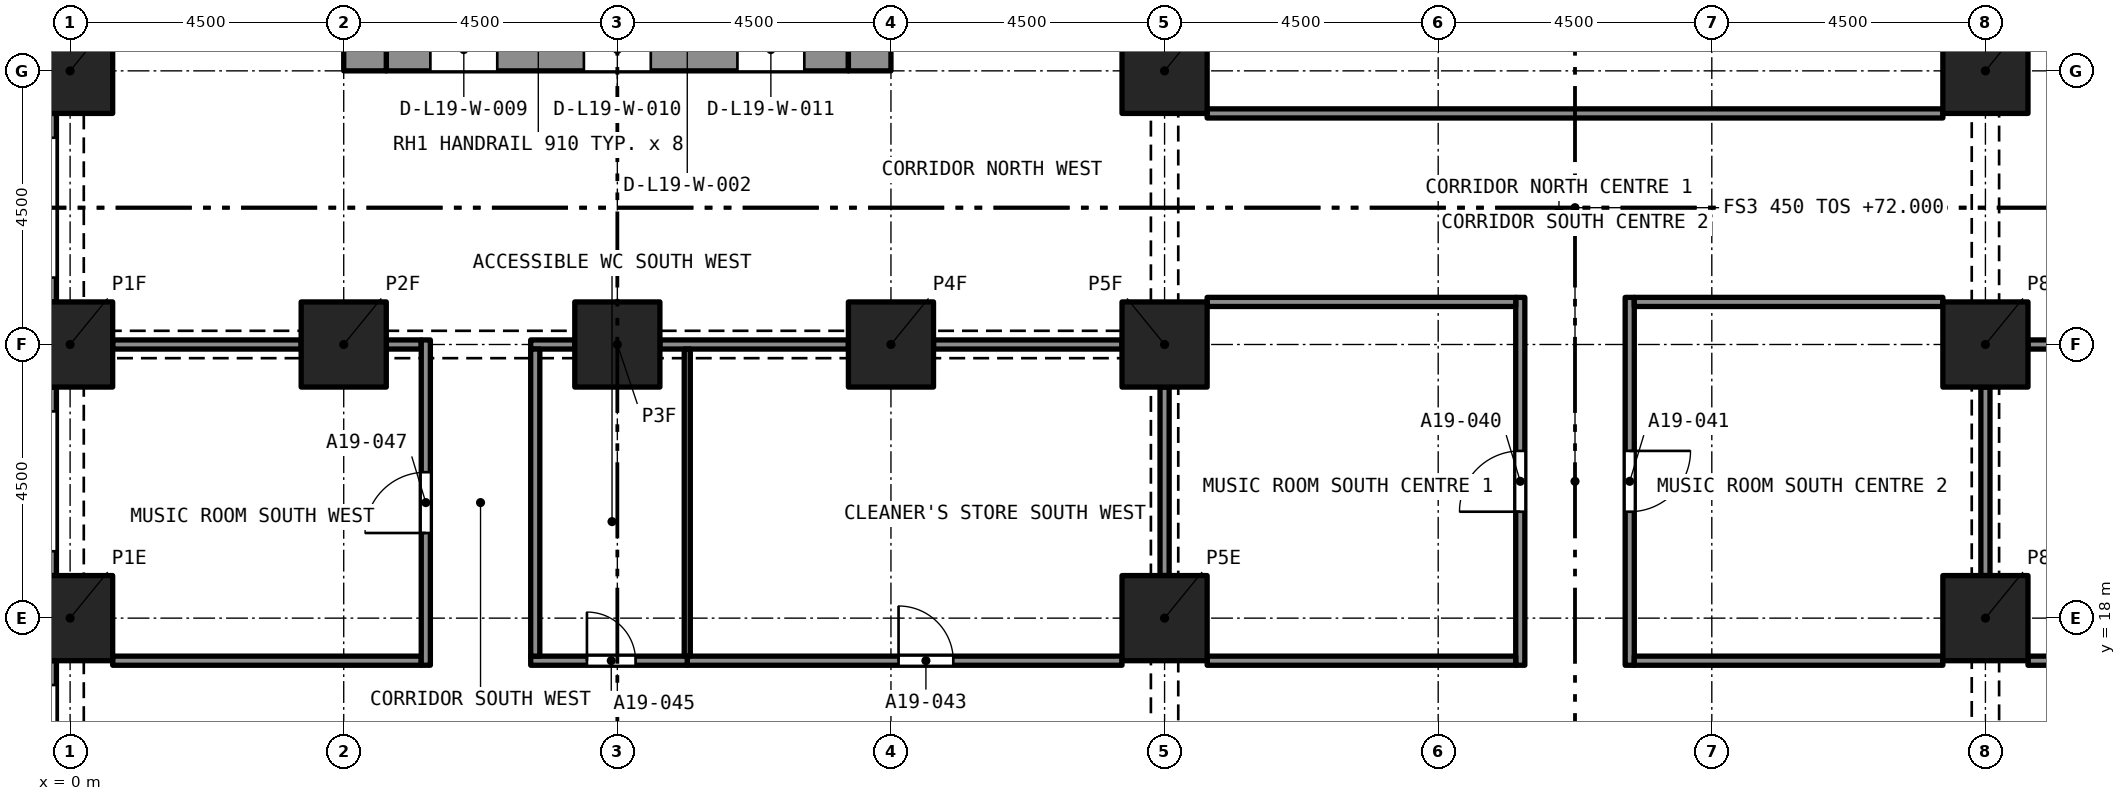
"""IFC4 building model, lengths in metres.
Left out: names, types, materials, properties, quantities, classifications, styles, units other than length and angle.
Written with IfcOpenShell. Run it as: python <this file> out.ifc"""

import sys

from ifc_helpers import new_model, si_unit, direction, frame, frame_2d, origin, origin_2d, place, context, subcontext, project, spatial, rectangle, extrude, element, fill, save


model = new_model("IFC4")
c1 = context("Model", 3, precision=1e-05, world=origin(), true_north=direction((0.0, 1.0)))
c2 = subcontext(c1, "Body", "Model", "MODEL_VIEW")
j1 = project(units=[si_unit("LENGTHUNIT", "METRE"), si_unit("PLANEANGLEUNIT", "RADIAN")], contexts=[c1])
p1 = place(None, origin())
s1 = spatial("IfcSite", under=j1, at=p1, CompositionType="ELEMENT")
p2 = place(p1, origin())
s2 = spatial("IfcBuilding", under=s1, at=p2, CompositionType="ELEMENT")
p3 = place(p2, frame((0.0, 0.0, 72.0)))
s3 = spatial("IfcBuildingStorey", under=s2, at=p3, CompositionType="ELEMENT", Elevation=72.0)
for number, where, z_axis, x_axis in (
    (1, (0.0, 18.0, 0.0), (0.0, 0.0, 1.0), (1.0, 0.0, 0.0)),
    (2, (18.0, 18.0, 0.0), (0.0, 0.0, 1.0), (1.0, 0.0, 0.0)),
    (3, (31.5, 18.0, 0.0), (0.0, 0.0, 1.0), (1.0, 0.0, 0.0)),
    (4, (0.0, 22.5, 0.0), (0.0, 0.0, 1.0), (1.0, 0.0, 0.0)),
    (5, (4.5, 22.5, 0.0), (0.0, 0.0, 1.0), (1.0, 0.0, 0.0)),
    (6, (9.0, 22.5, 0.0), (0.0, 0.0, 1.0), (1.0, 0.0, 0.0)),
    (7, (13.5, 22.5, 0.0), (0.0, 0.0, 1.0), (1.0, 0.0, 0.0)),
    (8, (18.0, 22.5, 0.0), (0.0, 0.0, 1.0), (1.0, 0.0, 0.0)),
    (9, (31.5, 22.5, 0.0), (0.0, 0.0, 1.0), (1.0, 0.0, 0.0)),
    (10, (0.0, 27.0, 0.0), (0.0, 0.0, 1.0), (1.0, 0.0, 0.0)),
    (11, (18.0, 27.0, 0.0), (0.0, 0.0, 1.0), (1.0, 0.0, 0.0)),
    (12, (31.5, 27.0, 0.0), (0.0, 0.0, 1.0), (1.0, 0.0, 0.0)),
):
    element("IfcColumn", number, at=place(p3, frame(where, z_axis=z_axis, x_axis=x_axis)), inside=s3, PredefinedType="COLUMN", context=c2, shape_type="SweptSolid", body=[
        extrude(rectangle(XDim=1.4, YDim=1.4, at=origin_2d()), origin(), (0.0, 0.0, 1.0), 3.2),
    ])
p4 = place(p3, frame((5.2, 27.35, 0.0), z_axis=(0.0, 0.0, 1.0), x_axis=(1.0, 0.0, 0.0)))
e13 = element("IfcWall", 13, at=p4, inside=s3, PredefinedType="SOLIDWALL", context=c2, shape_type="SweptSolid", body=[
    extrude(rectangle(XDim=7.6, YDim=0.7, at=frame_2d((3.8, 0.0))), origin(), (0.0, 0.0, 1.0), 3.2),
])
p5 = place(p4, frame((0.725, 0.0, 0.0)))
e14 = element("IfcOpeningElement", 14, at=p5, cuts=e13, PredefinedType="OPENING", context=c2, shape_type="SweptSolid", body=[
    extrude(rectangle(XDim=1.1, YDim=2.1, at=frame_2d((0.55, 1.05))), frame((0.0, 0.36, 0.0), z_axis=(0.0, -1.0, 0.0), x_axis=(1.0, 0.0, 0.0)), (0.0, 0.0, 1.0), 0.72),
])
p6 = place(p4, frame((3.25, 0.0, 0.0)))
e15 = element("IfcOpeningElement", 15, at=p6, cuts=e13, PredefinedType="OPENING", context=c2, shape_type="SweptSolid", body=[
    extrude(rectangle(XDim=1.1, YDim=2.1, at=frame_2d((0.55, 1.05))), frame((0.0, 0.36, 0.0), z_axis=(0.0, -1.0, 0.0), x_axis=(1.0, 0.0, 0.0)), (0.0, 0.0, 1.0), 0.72),
])
p7 = place(p4, frame((5.775, 0.0, 0.0)))
e16 = element("IfcOpeningElement", 16, at=p7, cuts=e13, PredefinedType="OPENING", context=c2, shape_type="SweptSolid", body=[
    extrude(rectangle(XDim=1.1, YDim=2.1, at=frame_2d((0.55, 1.05))), frame((0.0, 0.36, 0.0), z_axis=(0.0, -1.0, 0.0), x_axis=(1.0, 0.0, 0.0)), (0.0, 0.0, 1.0), 0.72),
])
p8 = place(p3, frame((4.85, 27.0, 0.0), z_axis=(0.0, 0.0, 1.0), x_axis=(0.0, 1.0, 0.0)))
e17 = element("IfcWall", 17, at=p8, inside=s3, PredefinedType="SOLIDWALL", context=c2, shape_type="SweptSolid", body=[
    extrude(rectangle(XDim=13.5, YDim=0.7, at=frame_2d((6.75, 0.0))), origin(), (0.0, 0.0, 1.0), 3.2),
])
p9 = place(p8, frame((8.95, 0.0, 0.0)))
e18 = element("IfcOpeningElement", 18, at=p9, cuts=e17, PredefinedType="OPENING", context=c2, shape_type="SweptSolid", body=[
    extrude(rectangle(XDim=1.2, YDim=2.1, at=frame_2d((0.6, 1.05))), frame((0.0, 0.36, 0.0), z_axis=(0.0, -1.0, 0.0), x_axis=(1.0, 0.0, 0.0)), (0.0, 0.0, 1.0), 0.72),
])
p10 = place(p3, frame((13.15, 27.0, 0.0), z_axis=(0.0, 0.0, 1.0), x_axis=(0.0, 1.0, 0.0)))
e19 = element("IfcWall", 19, at=p10, inside=s3, PredefinedType="SOLIDWALL", context=c2, shape_type="SweptSolid", body=[
    extrude(rectangle(XDim=13.5, YDim=0.7, at=frame_2d((6.75, 0.0))), origin(), (0.0, 0.0, 1.0), 3.2),
])
p11 = place(p10, frame((11.1, 0.0, 0.0)))
e20 = element("IfcOpeningElement", 20, at=p11, cuts=e19, PredefinedType="OPENING", context=c2, shape_type="SweptSolid", body=[
    extrude(rectangle(XDim=1.1, YDim=2.1, at=frame_2d((0.55, 1.05))), frame((0.0, 0.36, 0.0), z_axis=(0.0, -1.0, 0.0), x_axis=(1.0, 0.0, 0.0)), (0.0, 0.0, 1.0), 0.72),
])
p12 = place(p10, frame((8.95, 0.0, 0.0)))
e21 = element("IfcOpeningElement", 21, at=p12, cuts=e19, PredefinedType="OPENING", context=c2, shape_type="SweptSolid", body=[
    extrude(rectangle(XDim=1.2, YDim=2.1, at=frame_2d((0.6, 1.05))), frame((0.0, 0.36, 0.0), z_axis=(0.0, -1.0, 0.0), x_axis=(1.0, 0.0, 0.0)), (0.0, 0.0, 1.0), 0.72),
])
p13 = place(p3, frame((-0.375, 23.2, 0.0), z_axis=(0.0, 0.0, 1.0), x_axis=(0.0, 1.0, 0.0)))
e22 = element("IfcWall", 22, at=p13, inside=s3, PredefinedType="SOLIDWALL", context=c2, shape_type="SweptSolid", body=[
    extrude(rectangle(XDim=3.1, YDim=0.3, at=frame_2d((1.55, 0.0))), origin(), (0.0, 0.0, 1.0), 3.2),
])
p14 = place(p13, frame((0.4, 0.0, 0.45)))
e23 = element("IfcOpeningElement", 23, at=p14, cuts=e22, PredefinedType="OPENING", context=c2, shape_type="SweptSolid", body=[
    extrude(rectangle(XDim=2.3, YDim=1.95, at=frame_2d((1.15, 0.975))), frame((0.0, 0.16, 0.0), z_axis=(0.0, -1.0, 0.0), x_axis=(1.0, 0.0, 0.0)), (0.0, 0.0, 1.0), 0.32),
])
p15 = place(p3, frame((-0.375, 18.7, 0.0), z_axis=(0.0, 0.0, 1.0), x_axis=(0.0, 1.0, 0.0)))
e24 = element("IfcWall", 24, at=p15, inside=s3, PredefinedType="SOLIDWALL", context=c2, shape_type="SweptSolid", body=[
    extrude(rectangle(XDim=3.1, YDim=0.3, at=frame_2d((1.55, 0.0))), origin(), (0.0, 0.0, 1.0), 3.2),
])
p16 = place(p15, frame((0.4, 0.0, 0.45)))
e25 = element("IfcOpeningElement", 25, at=p16, cuts=e24, PredefinedType="OPENING", context=c2, shape_type="SweptSolid", body=[
    extrude(rectangle(XDim=2.3, YDim=1.95, at=frame_2d((1.15, 0.975))), frame((0.0, 0.16, 0.0), z_axis=(0.0, -1.0, 0.0), x_axis=(1.0, 0.0, 0.0)), (0.0, 0.0, 1.0), 0.32),
])
p17 = place(p3, frame((-0.375, 14.2, 0.0), z_axis=(0.0, 0.0, 1.0), x_axis=(0.0, 1.0, 0.0)))
e26 = element("IfcWall", 26, at=p17, inside=s3, PredefinedType="SOLIDWALL", context=c2, shape_type="SweptSolid", body=[
    extrude(rectangle(XDim=3.1, YDim=0.3, at=frame_2d((1.55, 0.0))), origin(), (0.0, 0.0, 1.0), 3.2),
])
p18 = place(p17, frame((0.4, 0.0, 0.45)))
e27 = element("IfcOpeningElement", 27, at=p18, cuts=e26, PredefinedType="OPENING", context=c2, shape_type="SweptSolid", body=[
    extrude(rectangle(XDim=2.3, YDim=1.95, at=frame_2d((1.15, 0.975))), frame((0.0, 0.16, 0.0), z_axis=(0.0, -1.0, 0.0), x_axis=(1.0, 0.0, 0.0)), (0.0, 0.0, 1.0), 0.32),
])
p19 = place(p3, frame((23.85, 17.225, 0.0), z_axis=(0.0, 0.0, 1.0), x_axis=(0.0, 1.0, 0.0)))
e28 = element("IfcWall", 28, at=p19, inside=s3, PredefinedType="PARTITIONING", context=c2, shape_type="SweptSolid", body=[
    extrude(rectangle(XDim=6.05, YDim=0.15, at=frame_2d((3.025, 0.0))), origin(), (0.0, 0.0, 1.0), 2.7),
])
p20 = place(p19, frame((2.525, 0.0, 0.0)))
e29 = element("IfcOpeningElement", 29, at=p20, cuts=e28, PredefinedType="OPENING", context=c2, shape_type="SweptSolid", body=[
    extrude(rectangle(XDim=1.0, YDim=2.1, at=frame_2d((0.5, 1.05))), frame((0.0, 0.085, 0.0), z_axis=(0.0, -1.0, 0.0), x_axis=(1.0, 0.0, 0.0)), (0.0, 0.0, 1.0), 0.17),
])
p21 = place(p3, frame((25.65, 23.275, 0.0), z_axis=(0.0, 0.0, 1.0), x_axis=(0.0, -1.0, 0.0)))
e30 = element("IfcWall", 30, at=p21, inside=s3, PredefinedType="PARTITIONING", context=c2, shape_type="SweptSolid", body=[
    extrude(rectangle(XDim=6.05, YDim=0.15, at=frame_2d((3.025, 0.0))), origin(), (0.0, 0.0, 1.0), 2.7),
])
p22 = place(p21, frame((2.525, 0.0, 0.0)))
e31 = element("IfcOpeningElement", 31, at=p22, cuts=e30, PredefinedType="OPENING", context=c2, shape_type="SweptSolid", body=[
    extrude(rectangle(XDim=1.0, YDim=2.1, at=frame_2d((0.5, 1.05))), frame((0.0, 0.085, 0.0), z_axis=(0.0, -1.0, 0.0), x_axis=(1.0, 0.0, 0.0)), (0.0, 0.0, 1.0), 0.17),
])
for number, where, z_axis, x_axis in (
    (32, (18.7, 17.3, 0.0), (0.0, 0.0, 1.0), (1.0, 0.0, 0.0)),
    (33, (25.725, 17.3, 0.0), (0.0, 0.0, 1.0), (1.0, 0.0, 0.0)),
):
    element("IfcWall", number, at=place(p3, frame(where, z_axis=z_axis, x_axis=x_axis)), inside=s3, PredefinedType="PARTITIONING", context=c2, shape_type="SweptSolid", body=[
        extrude(rectangle(XDim=5.075, YDim=0.15, at=frame_2d((2.538, 0.0))), origin(), (0.0, 0.0, 1.0), 2.7),
    ])
p23 = place(p3, frame((32.2, 17.3, 0.0), z_axis=(0.0, 0.0, 1.0), x_axis=(1.0, 0.0, 0.0)))
e34 = element("IfcWall", 34, at=p23, inside=s3, PredefinedType="PARTITIONING", context=c2, shape_type="SweptSolid", body=[
    extrude(rectangle(XDim=7.15, YDim=0.15, at=frame_2d((3.575, 0.0))), origin(), (0.0, 0.0, 1.0), 2.7),
])
p24 = place(p23, frame((2.775, 0.0, 0.0)))
e35 = element("IfcOpeningElement", 35, at=p24, cuts=e34, PredefinedType="OPENING", context=c2, shape_type="SweptSolid", body=[
    extrude(rectangle(XDim=0.9, YDim=2.1, at=frame_2d((0.45, 1.05))), frame((0.0, 0.085, 0.0), z_axis=(0.0, -1.0, 0.0), x_axis=(1.0, 0.0, 0.0)), (0.0, 0.0, 1.0), 0.17),
])
p25 = place(p3, frame((10.15, 17.3, 0.0), z_axis=(0.0, 0.0, 1.0), x_axis=(1.0, 0.0, 0.0)))
e36 = element("IfcWall", 36, at=p25, inside=s3, PredefinedType="PARTITIONING", context=c2, shape_type="SweptSolid", body=[
    extrude(rectangle(XDim=7.15, YDim=0.15, at=frame_2d((3.575, 0.0))), origin(), (0.0, 0.0, 1.0), 2.7),
])
p26 = place(p25, frame((3.475, 0.0, 0.0)))
e37 = element("IfcOpeningElement", 37, at=p26, cuts=e36, PredefinedType="OPENING", context=c2, shape_type="SweptSolid", body=[
    extrude(rectangle(XDim=0.9, YDim=2.1, at=frame_2d((0.45, 1.05))), frame((0.0, 0.085, 0.0), z_axis=(0.0, -1.0, 0.0), x_axis=(1.0, 0.0, 0.0)), (0.0, 0.0, 1.0), 0.17),
])
p27 = place(p3, frame((7.575, 17.3, 0.0), z_axis=(0.0, 0.0, 1.0), x_axis=(1.0, 0.0, 0.0)))
e38 = element("IfcWall", 38, at=p27, inside=s3, PredefinedType="PARTITIONING", context=c2, shape_type="SweptSolid", body=[
    extrude(rectangle(XDim=2.575, YDim=0.15, at=frame_2d((1.288, 0.0))), origin(), (0.0, 0.0, 1.0), 2.7),
])
p28 = place(p27, frame((0.925, 0.0, 0.0)))
e39 = element("IfcOpeningElement", 39, at=p28, cuts=e38, PredefinedType="OPENING", context=c2, shape_type="SweptSolid", body=[
    extrude(rectangle(XDim=0.8, YDim=2.1, at=frame_2d((0.4, 1.05))), frame((0.0, 0.085, 0.0), z_axis=(0.0, -1.0, 0.0), x_axis=(1.0, 0.0, 0.0)), (0.0, 0.0, 1.0), 0.17),
])
p29 = place(p3, frame((0.7, 17.3, 0.0), z_axis=(0.0, 0.0, 1.0), x_axis=(1.0, 0.0, 0.0)))
e40 = element("IfcWall", 40, at=p29, inside=s3, PredefinedType="PARTITIONING", context=c2, shape_type="SweptSolid", body=[
    extrude(rectangle(XDim=5.075, YDim=0.15, at=frame_2d((2.538, 0.0))), origin(), (0.0, 0.0, 1.0), 2.7),
])
p30 = place(p3, frame((18.7, 26.3, 0.0), z_axis=(0.0, 0.0, 1.0), x_axis=(1.0, 0.0, 0.0)))
e41 = element("IfcWall", 41, at=p30, inside=s3, PredefinedType="PARTITIONING", context=c2, shape_type="SweptSolid", body=[
    extrude(rectangle(XDim=12.1, YDim=0.15, at=frame_2d((6.05, 0.0))), origin(), (0.0, 0.0, 1.0), 2.7),
])
p31 = place(p3, frame((18.7, 23.2, 0.0), z_axis=(0.0, 0.0, 1.0), x_axis=(1.0, 0.0, 0.0)))
e42 = element("IfcWall", 42, at=p31, inside=s3, PredefinedType="PARTITIONING", context=c2, shape_type="SweptSolid", body=[
    extrude(rectangle(XDim=5.075, YDim=0.15, at=frame_2d((2.538, 0.0))), origin(), (0.0, 0.0, 1.0), 2.7),
])
p32 = place(p3, frame((18.0, 18.7, 0.0), z_axis=(0.0, 0.0, 1.0), x_axis=(0.0, 1.0, 0.0)))
e43 = element("IfcWall", 43, at=p32, inside=s3, PredefinedType="PARTITIONING", context=c2, shape_type="SweptSolid", body=[
    extrude(rectangle(XDim=3.1, YDim=0.15, at=frame_2d((1.55, 0.0))), origin(), (0.0, 0.0, 1.0), 2.38),
])
p33 = place(p3, frame((25.725, 23.2, 0.0), z_axis=(0.0, 0.0, 1.0), x_axis=(1.0, 0.0, 0.0)))
e44 = element("IfcWall", 44, at=p33, inside=s3, PredefinedType="PARTITIONING", context=c2, shape_type="SweptSolid", body=[
    extrude(rectangle(XDim=5.075, YDim=0.15, at=frame_2d((2.538, 0.0))), origin(), (0.0, 0.0, 1.0), 2.7),
])
p34 = place(p3, frame((31.5, 18.7, 0.0), z_axis=(0.0, 0.0, 1.0), x_axis=(0.0, 1.0, 0.0)))
e45 = element("IfcWall", 45, at=p34, inside=s3, PredefinedType="PARTITIONING", context=c2, shape_type="SweptSolid", body=[
    extrude(rectangle(XDim=3.1, YDim=0.15, at=frame_2d((1.55, 0.0))), origin(), (0.0, 0.0, 1.0), 2.38),
])
p35 = place(p3, frame((32.2, 22.5, 0.0), z_axis=(0.0, 0.0, 1.0), x_axis=(1.0, 0.0, 0.0)))
e46 = element("IfcWall", 46, at=p35, inside=s3, PredefinedType="PARTITIONING", context=c2, shape_type="SweptSolid", body=[
    extrude(rectangle(XDim=9.725, YDim=0.15, at=frame_2d((4.863, 0.0))), origin(), (0.0, 0.0, 1.0), 2.7),
])
for number, where, z_axis, x_axis in (
    (47, (14.2, 22.5, 0.0), (0.0, 0.0, 1.0), (1.0, 0.0, 0.0)),
    (48, (9.7, 22.5, 0.0), (0.0, 0.0, 1.0), (1.0, 0.0, 0.0)),
):
    element("IfcWall", number, at=place(p3, frame(where, z_axis=z_axis, x_axis=x_axis)), inside=s3, PredefinedType="PARTITIONING", context=c2, shape_type="SweptSolid", body=[
        extrude(rectangle(XDim=3.1, YDim=0.15, at=frame_2d((1.55, 0.0))), origin(), (0.0, 0.0, 1.0), 2.38),
    ])
p36 = place(p3, frame((7.575, 22.5, 0.0), z_axis=(0.0, 0.0, 1.0), x_axis=(1.0, 0.0, 0.0)))
e49 = element("IfcWall", 49, at=p36, inside=s3, PredefinedType="PARTITIONING", context=c2, shape_type="SweptSolid", body=[
    extrude(rectangle(XDim=0.725, YDim=0.15, at=frame_2d((0.363, 0.0))), origin(), (0.0, 0.0, 1.0), 2.38),
])
p37 = place(p3, frame((5.2, 22.5, 0.0), z_axis=(0.0, 0.0, 1.0), x_axis=(1.0, 0.0, 0.0)))
e50 = element("IfcWall", 50, at=p37, inside=s3, PredefinedType="PARTITIONING", context=c2, shape_type="SweptSolid", body=[
    extrude(rectangle(XDim=0.575, YDim=0.15, at=frame_2d((0.288, 0.0))), origin(), (0.0, 0.0, 1.0), 2.38),
])
p38 = place(p3, frame((0.7, 22.5, 0.0), z_axis=(0.0, 0.0, 1.0), x_axis=(1.0, 0.0, 0.0)))
e51 = element("IfcWall", 51, at=p38, inside=s3, PredefinedType="PARTITIONING", context=c2, shape_type="SweptSolid", body=[
    extrude(rectangle(XDim=3.1, YDim=0.15, at=frame_2d((1.55, 0.0))), origin(), (0.0, 0.0, 1.0), 2.38),
])
p39 = place(p3, frame((7.65, 17.375, 0.0), z_axis=(0.0, 0.0, 1.0), x_axis=(0.0, 1.0, 0.0)))
e52 = element("IfcWall", 52, at=p39, inside=s3, PredefinedType="PARTITIONING", context=c2, shape_type="SweptSolid", body=[
    extrude(rectangle(XDim=5.05, YDim=0.15, at=frame_2d((2.525, 0.0))), origin(), (0.0, 0.0, 1.0), 2.7),
])
p40 = place(p3, frame((5.85, 17.225, 0.0), z_axis=(0.0, 0.0, 1.0), x_axis=(0.0, 1.0, 0.0)))
e53 = element("IfcWall", 53, at=p40, inside=s3, PredefinedType="PARTITIONING", context=c2, shape_type="SweptSolid", body=[
    extrude(rectangle(XDim=5.35, YDim=0.15, at=frame_2d((2.675, 0.0))), origin(), (0.0, 0.0, 1.0), 2.7),
])
p41 = place(p40, frame((2.175, 0.0, 0.0)))
e54 = element("IfcOpeningElement", 54, at=p41, cuts=e53, PredefinedType="OPENING", context=c2, shape_type="SweptSolid", body=[
    extrude(rectangle(XDim=1.0, YDim=2.1, at=frame_2d((0.5, 1.05))), frame((0.0, 0.085, 0.0), z_axis=(0.0, -1.0, 0.0), x_axis=(1.0, 0.0, 0.0)), (0.0, 0.0, 1.0), 0.17),
])
p42 = place(p3, frame((10.15, 17.375, 0.0), z_axis=(0.0, 0.0, 1.0), x_axis=(0.0, 1.0, 0.0)))
e55 = element("IfcWall", 55, at=p42, inside=s3, PredefinedType="PARTITIONING", context=c2, shape_type="SweptSolid", body=[
    extrude(rectangle(XDim=5.05, YDim=0.1, at=frame_2d((2.525, 0.0))), origin(), (0.0, 0.0, 1.0), 2.7),
])
p43 = place(p20, origin())
e56 = element("IfcDoor", 56, at=p43, inside=s3, OperationType="SINGLE_SWING_RIGHT", PredefinedType="DOOR", context=c2, shape_type="SweptSolid", body=[
    extrude(rectangle(XDim=1.0, YDim=2.1, at=frame_2d((0.5, 1.05))), frame((0.0, 0.025, 0.0), z_axis=(0.0, -1.0, 0.0), x_axis=(1.0, 0.0, 0.0)), (0.0, 0.0, 1.0), 0.05),
])
fill(e29, e56)
p44 = place(p22, origin())
e57 = element("IfcDoor", 57, at=p44, inside=s3, OperationType="SINGLE_SWING_RIGHT", PredefinedType="DOOR", context=c2, shape_type="SweptSolid", body=[
    extrude(rectangle(XDim=1.0, YDim=2.1, at=frame_2d((0.5, 1.05))), frame((0.0, 0.025, 0.0), z_axis=(0.0, -1.0, 0.0), x_axis=(1.0, 0.0, 0.0)), (0.0, 0.0, 1.0), 0.05),
])
fill(e31, e57)
p45 = place(p26, origin())
e58 = element("IfcDoor", 58, at=p45, inside=s3, OperationType="SINGLE_SWING_RIGHT", PredefinedType="DOOR", context=c2, shape_type="SweptSolid", body=[
    extrude(rectangle(XDim=0.9, YDim=2.1, at=frame_2d((0.45, 1.05))), frame((0.0, 0.025, 0.0), z_axis=(0.0, -1.0, 0.0), x_axis=(1.0, 0.0, 0.0)), (0.0, 0.0, 1.0), 0.05),
])
fill(e37, e58)
p46 = place(p28, origin())
e59 = element("IfcDoor", 59, at=p46, inside=s3, OperationType="SINGLE_SWING_RIGHT", PredefinedType="DOOR", context=c2, shape_type="SweptSolid", body=[
    extrude(rectangle(XDim=0.8, YDim=2.1, at=frame_2d((0.4, 1.05))), frame((0.0, 0.025, 0.0), z_axis=(0.0, -1.0, 0.0), x_axis=(1.0, 0.0, 0.0)), (0.0, 0.0, 1.0), 0.05),
])
fill(e39, e59)
p47 = place(p41, origin())
e60 = element("IfcDoor", 60, at=p47, inside=s3, OperationType="SINGLE_SWING_LEFT", PredefinedType="DOOR", context=c2, shape_type="SweptSolid", body=[
    extrude(rectangle(XDim=1.0, YDim=2.1, at=frame_2d((0.5, 1.05))), frame((0.0, 0.025, 0.0), z_axis=(0.0, -1.0, 0.0), x_axis=(1.0, 0.0, 0.0)), (0.0, 0.0, 1.0), 0.05),
])
fill(e54, e60)
save(model, sys.argv[1])
